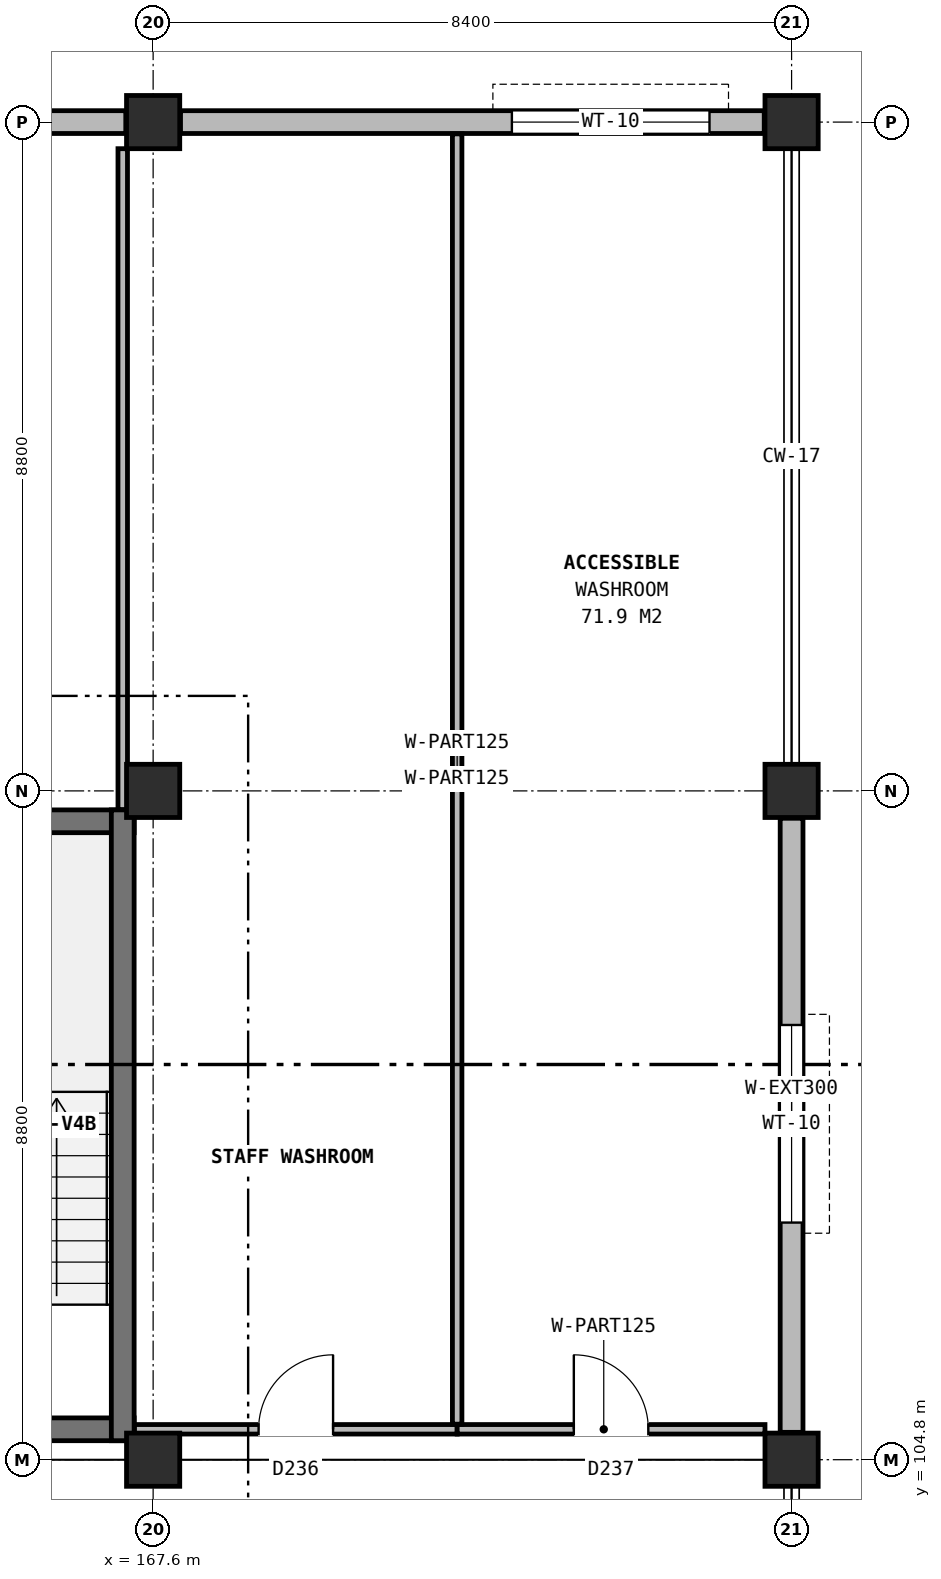
"""IFC4 building model, lengths in metres.
Left out: names, types, materials, properties, quantities, classifications, styles, units other than length and angle.
Written with IfcOpenShell. Run it as: python <this file> out.ifc"""

import sys

from ifc_helpers import new_model, si_unit, direction, frame, frame_2d, origin, origin_2d, place, context, subcontext, project, spatial, rectangle, extrude, element, fill, save


model = new_model("IFC4")
c1 = context("Model", 3, precision=1e-05, world=origin(), true_north=direction((0.0, 1.0)))
c2 = subcontext(c1, "Body", "Model", "MODEL_VIEW")
j1 = project(units=[si_unit("LENGTHUNIT", "METRE"), si_unit("PLANEANGLEUNIT", "RADIAN")], contexts=[c1])
p1 = place(None, origin())
s1 = spatial("IfcSite", under=j1, at=p1, CompositionType="ELEMENT")
p2 = place(p1, origin())
s2 = spatial("IfcBuilding", under=s1, at=p2, CompositionType="ELEMENT")
p3 = place(p2, frame((0.0, 0.0, 36.8)))
s3 = spatial("IfcBuildingStorey", under=s2, at=p3, CompositionType="ELEMENT", Elevation=36.8)
for number, where, z_axis, x_axis in (
    (1, (167.6, 104.8, 0.0), (0.0, 0.0, 1.0), (1.0, 0.0, 0.0)),
    (2, (167.6, 113.6, 0.0), (0.0, 0.0, 1.0), (1.0, 0.0, 0.0)),
    (3, (167.6, 122.4, 0.0), (0.0, 0.0, 1.0), (1.0, 0.0, 0.0)),
    (4, (176.0, 104.8, 0.0), (0.0, 0.0, 1.0), (1.0, 0.0, 0.0)),
    (5, (176.0, 113.6, 0.0), (0.0, 0.0, 1.0), (1.0, 0.0, 0.0)),
    (6, (176.0, 122.4, 0.0), (0.0, 0.0, 1.0), (1.0, 0.0, 0.0)),
):
    element("IfcColumn", number, at=place(p3, frame(where, z_axis=z_axis, x_axis=x_axis)), inside=s3, PredefinedType="COLUMN", context=c2, shape_type="SweptSolid", body=[
        extrude(rectangle(XDim=0.7, YDim=0.7, at=origin_2d()), origin(), (0.0, 0.0, 1.0), 3.8),
    ])
p4 = place(p3, frame((176.0, 105.16, 0.0), z_axis=(0.0, 0.0, 1.0), x_axis=(0.0, 1.0, 0.0)))
e7 = element("IfcWall", 7, at=p4, inside=s3, PredefinedType="SOLIDWALL", context=c2, shape_type="SweptSolid", body=[
    extrude(rectangle(XDim=8.08, YDim=0.3, at=frame_2d((4.04, 0.0))), origin(), (0.0, 0.0, 1.0), 3.05),
])
p5 = place(p4, frame((2.76, 0.0, 0.9)))
e8 = element("IfcOpeningElement", 8, at=p5, cuts=e7, PredefinedType="OPENING", context=c2, shape_type="SweptSolid", body=[
    extrude(rectangle(XDim=2.6, YDim=2.0, at=frame_2d((1.3, 1.0))), frame((0.0, 0.16, 0.0), z_axis=(0.0, -1.0, 0.0), x_axis=(1.0, 0.0, 0.0)), (0.0, 0.0, 1.0), 0.32),
])
p6 = place(p3, frame((175.64, 122.4, 0.0), z_axis=(0.0, 0.0, 1.0), x_axis=(-1.0, 0.0, 0.0)))
e9 = element("IfcWall", 9, at=p6, inside=s3, PredefinedType="SOLIDWALL", context=c2, shape_type="SweptSolid", body=[
    extrude(rectangle(XDim=7.68, YDim=0.3, at=frame_2d((3.84, 0.0))), origin(), (0.0, 0.0, 1.0), 3.05),
])
p7 = place(p6, frame((0.72, 0.0, 0.9)))
e10 = element("IfcOpeningElement", 10, at=p7, cuts=e9, PredefinedType="OPENING", context=c2, shape_type="SweptSolid", body=[
    extrude(rectangle(XDim=2.6, YDim=2.0, at=frame_2d((1.3, 1.0))), frame((0.0, 0.16, 0.0), z_axis=(0.0, -1.0, 0.0), x_axis=(1.0, 0.0, 0.0)), (0.0, 0.0, 1.0), 0.32),
])
p8 = place(p3, frame((167.24, 122.4, 0.0), z_axis=(0.0, 0.0, 1.0), x_axis=(-1.0, 0.0, 0.0)))
e11 = element("IfcWall", 11, at=p8, inside=s3, PredefinedType="SOLIDWALL", context=c2, shape_type="SweptSolid", body=[
    extrude(rectangle(XDim=7.68, YDim=0.3, at=frame_2d((3.84, 0.0))), origin(), (0.0, 0.0, 1.0), 3.05),
])
p9 = place(p8, frame((2.56, 0.0, 0.9)))
e12 = element("IfcOpeningElement", 12, at=p9, cuts=e11, PredefinedType="OPENING", context=c2, shape_type="SweptSolid", body=[
    extrude(rectangle(XDim=2.6, YDim=2.0, at=frame_2d((1.3, 1.0))), frame((0.0, 0.16, 0.0), z_axis=(0.0, -1.0, 0.0), x_axis=(1.0, 0.0, 0.0)), (0.0, 0.0, 1.0), 0.32),
])
p10 = place(p3, frame((163.75, 105.2, 0.0), z_axis=(0.0, 0.0, 1.0), x_axis=(1.0, 0.0, 0.0)))
e13 = element("IfcWall", 13, at=p10, inside=s3, PredefinedType="SHEAR", context=c2, shape_type="SweptSolid", body=[
    extrude(rectangle(XDim=3.6, YDim=0.3, at=frame_2d((1.8, 0.0))), origin(), (0.0, 0.0, 1.0), 3.8),
])
p11 = place(p10, frame((1.05, 0.0, 0.0)))
e14 = element("IfcOpeningElement", 14, at=p11, cuts=e13, PredefinedType="OPENING", context=c2, shape_type="SweptSolid", body=[
    extrude(rectangle(XDim=1.1, YDim=2.2, at=frame_2d((0.55, 1.1))), frame((0.0, 0.16, 0.0), z_axis=(0.0, -1.0, 0.0), x_axis=(1.0, 0.0, 0.0)), (0.0, 0.0, 1.0), 0.32),
])
p12 = place(p3, frame((163.75, 113.2, 0.0), z_axis=(0.0, 0.0, 1.0), x_axis=(1.0, 0.0, 0.0)))
e15 = element("IfcWall", 15, at=p12, inside=s3, PredefinedType="SHEAR", context=c2, shape_type="SweptSolid", body=[
    extrude(rectangle(XDim=3.6, YDim=0.3, at=frame_2d((1.8, 0.0))), origin(), (0.0, 0.0, 1.0), 3.8),
])
p13 = place(p3, frame((167.2, 105.05, 0.0), z_axis=(0.0, 0.0, 1.0), x_axis=(0.0, 1.0, 0.0)))
e16 = element("IfcWall", 16, at=p13, inside=s3, PredefinedType="SHEAR", context=c2, shape_type="SweptSolid", body=[
    extrude(rectangle(XDim=8.3, YDim=0.3, at=frame_2d((4.15, 0.0))), origin(), (0.0, 0.0, 1.0), 3.8),
])
p14 = place(p3, frame((167.355, 105.2, 0.0), z_axis=(0.0, 0.0, 1.0), x_axis=(1.0, 0.0, 0.0)))
e17 = element("IfcWall", 17, at=p14, inside=s3, PredefinedType="PARTITIONING", context=c2, shape_type="SweptSolid", body=[
    extrude(rectangle(XDim=4.245, YDim=0.125, at=frame_2d((2.123, 0.0))), origin(), (0.0, 0.0, 1.0), 3.045),
])
p15 = place(p14, frame((1.633, 0.0, 0.0)))
e18 = element("IfcOpeningElement", 18, at=p15, cuts=e17, PredefinedType="OPENING", context=c2, shape_type="SweptSolid", body=[
    extrude(rectangle(XDim=0.98, YDim=2.1, at=frame_2d((0.49, 1.05))), frame((0.0, 0.073, 0.0), z_axis=(0.0, -1.0, 0.0), x_axis=(1.0, 0.0, 0.0)), (0.0, 0.0, 1.0), 0.145),
])
p16 = place(p3, frame((171.6, 105.2, 0.0), z_axis=(0.0, 0.0, 1.0), x_axis=(1.0, 0.0, 0.0)))
e19 = element("IfcWall", 19, at=p16, inside=s3, PredefinedType="PARTITIONING", context=c2, shape_type="SweptSolid", body=[
    extrude(rectangle(XDim=4.05, YDim=0.125, at=frame_2d((2.025, 0.0))), origin(), (0.0, 0.0, 1.0), 3.045),
])
p17 = place(p16, frame((1.535, 0.0, 0.0)))
e20 = element("IfcOpeningElement", 20, at=p17, cuts=e19, PredefinedType="OPENING", context=c2, shape_type="SweptSolid", body=[
    extrude(rectangle(XDim=0.98, YDim=2.1, at=frame_2d((0.49, 1.05))), frame((0.0, 0.073, 0.0), z_axis=(0.0, -1.0, 0.0), x_axis=(1.0, 0.0, 0.0)), (0.0, 0.0, 1.0), 0.145),
])
p18 = place(p3, frame((167.2, 113.355, 0.0), z_axis=(0.0, 0.0, 1.0), x_axis=(0.0, 1.0, 0.0)))
e21 = element("IfcWall", 21, at=p18, inside=s3, PredefinedType="PARTITIONING", context=c2, shape_type="SweptSolid", body=[
    extrude(rectangle(XDim=8.695, YDim=0.125, at=frame_2d((4.348, 0.0))), origin(), (0.0, 0.0, 1.0), 3.045),
])
p19 = place(p3, frame((171.6, 105.268, 0.0), z_axis=(0.0, 0.0, 1.0), x_axis=(0.0, 1.0, 0.0)))
e22 = element("IfcWall", 22, at=p19, inside=s3, PredefinedType="PARTITIONING", context=c2, shape_type="SweptSolid", body=[
    extrude(rectangle(XDim=16.978, YDim=0.125, at=frame_2d((8.489, 0.0))), origin(), (0.0, 0.0, 1.0), 3.465),
])
p20 = place(p5, origin())
e23 = element("IfcWindow", 23, at=p20, inside=s3, PartitioningType="SINGLE_PANEL", PredefinedType="WINDOW", context=c2, shape_type="SweptSolid", body=[
    extrude(rectangle(XDim=2.6, YDim=2.0, at=frame_2d((1.3, 1.0))), frame((0.0, 0.03, 0.0), z_axis=(0.0, -1.0, 0.0), x_axis=(1.0, 0.0, 0.0)), (0.0, 0.0, 1.0), 0.06),
])
fill(e8, e23)
p21 = place(p7, origin())
e24 = element("IfcWindow", 24, at=p21, inside=s3, PartitioningType="SINGLE_PANEL", PredefinedType="WINDOW", context=c2, shape_type="SweptSolid", body=[
    extrude(rectangle(XDim=2.6, YDim=2.0, at=frame_2d((1.3, 1.0))), frame((0.0, 0.03, 0.0), z_axis=(0.0, -1.0, 0.0), x_axis=(1.0, 0.0, 0.0)), (0.0, 0.0, 1.0), 0.06),
])
fill(e10, e24)
p22 = place(p15, origin())
e25 = element("IfcDoor", 25, at=p22, inside=s3, OperationType="SINGLE_SWING_RIGHT", PredefinedType="DOOR", context=c2, shape_type="SweptSolid", body=[
    extrude(rectangle(XDim=0.98, YDim=2.1, at=frame_2d((0.49, 1.05))), frame((0.0, 0.025, 0.0), z_axis=(0.0, -1.0, 0.0), x_axis=(1.0, 0.0, 0.0)), (0.0, 0.0, 1.0), 0.05),
])
fill(e18, e25)
p23 = place(p17, origin())
e26 = element("IfcDoor", 26, at=p23, inside=s3, OperationType="SINGLE_SWING_LEFT", PredefinedType="DOOR", context=c2, shape_type="SweptSolid", body=[
    extrude(rectangle(XDim=0.98, YDim=2.1, at=frame_2d((0.49, 1.05))), frame((0.0, 0.025, 0.0), z_axis=(0.0, -1.0, 0.0), x_axis=(1.0, 0.0, 0.0)), (0.0, 0.0, 1.0), 0.05),
])
fill(e20, e26)
save(model, sys.argv[1])
